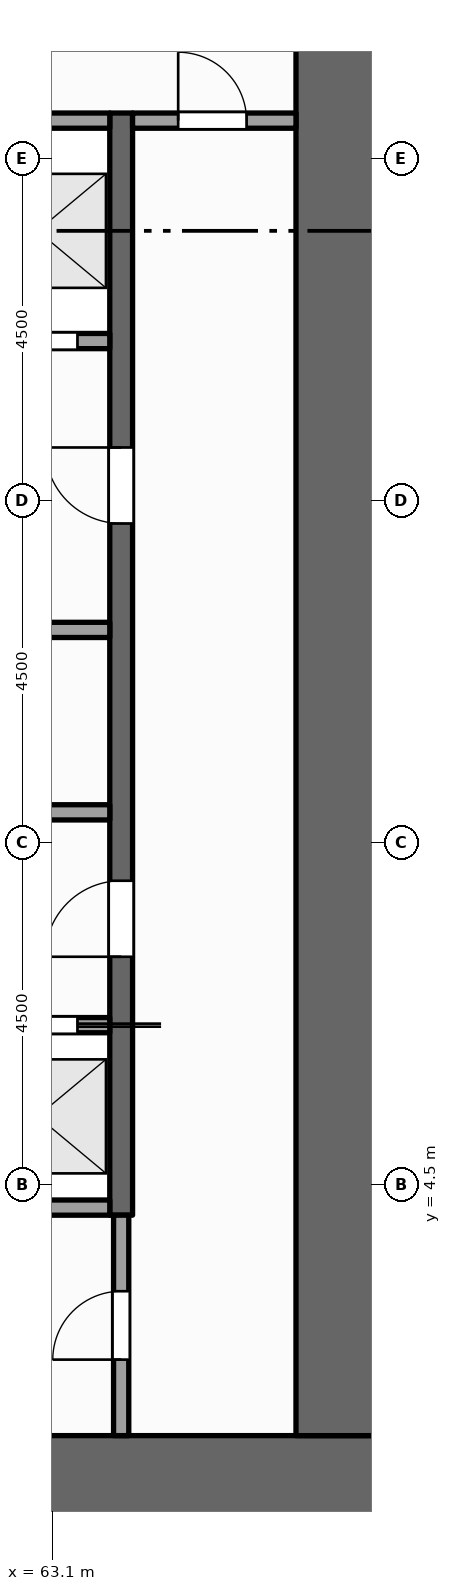
"""IFC4 building model, lengths in metres.
Left out: names, types, materials, properties, quantities, classifications, styles, units other than length and angle.
Written with IfcOpenShell. Run it as: python <this file> out.ifc"""

import sys

from ifc_helpers import new_model, si_unit, direction, frame, frame_2d, origin, place, context, subcontext, project, spatial, rectangle, extrude, element, fill, save


model = new_model("IFC4")
c1 = context("Model", 3, precision=1e-05, world=origin(), true_north=direction((0.0, 1.0)))
c2 = subcontext(c1, "Body", "Model", "MODEL_VIEW")
j1 = project(units=[si_unit("LENGTHUNIT", "METRE"), si_unit("PLANEANGLEUNIT", "RADIAN")], contexts=[c1])
p1 = place(None, origin())
s1 = spatial("IfcSite", under=j1, at=p1, CompositionType="ELEMENT")
p2 = place(p1, origin())
s2 = spatial("IfcBuilding", under=s1, at=p2, CompositionType="ELEMENT")
p3 = place(p2, frame((0.0, 0.0, 8.0)))
s3 = spatial("IfcBuildingStorey", under=s2, at=p3, CompositionType="ELEMENT", Elevation=8.0)
p4 = place(p3, frame((67.5, 0.6, -0.15), z_axis=(0.0, 0.0, 1.0), x_axis=(-1.0, 0.0, 0.0)))
e1 = element("IfcWall", 1, at=p4, inside=s3, PredefinedType="SHEAR", context=c2, shape_type="SweptSolid", body=[
    extrude(rectangle(XDim=13.5, YDim=1.2, at=frame_2d((6.75, 0.0))), origin(), (0.0, 0.0, 1.0), 6.0),
])
p5 = place(p3, frame((66.9, 1.2, -0.15), z_axis=(0.0, 0.0, 1.0), x_axis=(0.0, 1.0, 0.0)))
e2 = element("IfcWall", 2, at=p5, inside=s3, PredefinedType="SHEAR", context=c2, shape_type="SweptSolid", body=[
    extrude(rectangle(XDim=20.1, YDim=1.2, at=frame_2d((10.05, 0.0))), origin(), (0.0, 0.0, 1.0), 6.0),
])
p6 = place(p3, frame((64.0, 1.2, 0.0), z_axis=(0.0, 0.0, 1.0), x_axis=(0.0, 1.0, 0.0)))
e3 = element("IfcWall", 3, at=p6, inside=s3, PredefinedType="PARTITIONING", context=c2, shape_type="SweptSolid", body=[
    extrude(rectangle(XDim=2.9, YDim=0.2, at=frame_2d((1.45, 0.0))), origin(), (0.0, 0.0, 1.0), 5.75),
])
p7 = place(p6, frame((1.0, 0.0, 0.0)))
e4 = element("IfcOpeningElement", 4, at=p7, cuts=e3, PredefinedType="OPENING", context=c2, shape_type="SweptSolid", body=[
    extrude(rectangle(XDim=0.9, YDim=2.1, at=frame_2d((0.45, 1.05))), frame((0.0, 0.11, 0.0), z_axis=(0.0, -1.0, 0.0), x_axis=(1.0, 0.0, 0.0)), (0.0, 0.0, 1.0), 0.22),
])
p8 = place(p3, frame((64.0, 4.1, 0.0), z_axis=(0.0, 0.0, 1.0), x_axis=(0.0, 1.0, 0.0)))
e5 = element("IfcWall", 5, at=p8, inside=s3, PredefinedType="SHEAR", context=c2, shape_type="SweptSolid", body=[
    extrude(rectangle(XDim=14.5, YDim=0.3, at=frame_2d((7.25, 0.0))), origin(), (0.0, 0.0, 1.0), 5.75),
])
p9 = place(p8, frame((3.4, 0.0, 0.0)))
e6 = element("IfcOpeningElement", 6, at=p9, cuts=e5, PredefinedType="OPENING", context=c2, shape_type="SweptSolid", body=[
    extrude(rectangle(XDim=1.0, YDim=2.1, at=frame_2d((0.5, 1.05))), frame((0.0, 0.16, 0.0), z_axis=(0.0, -1.0, 0.0), x_axis=(1.0, 0.0, 0.0)), (0.0, 0.0, 1.0), 0.32),
])
p10 = place(p8, frame((9.1, 0.0, 0.0)))
e7 = element("IfcOpeningElement", 7, at=p10, cuts=e5, PredefinedType="OPENING", context=c2, shape_type="SweptSolid", body=[
    extrude(rectangle(XDim=1.0, YDim=2.1, at=frame_2d((0.5, 1.05))), frame((0.0, 0.16, 0.0), z_axis=(0.0, -1.0, 0.0), x_axis=(1.0, 0.0, 0.0)), (0.0, 0.0, 1.0), 0.32),
])
p11 = place(p3, frame((61.9, 4.2, 0.0), z_axis=(0.0, 0.0, 1.0), x_axis=(1.0, 0.0, 0.0)))
e8 = element("IfcWall", 8, at=p11, inside=s3, PredefinedType="SOLIDWALL", context=c2, shape_type="SweptSolid", body=[
    extrude(rectangle(XDim=1.95, YDim=0.2, at=frame_2d((0.975, 0.0))), origin(), (0.0, 0.0, 1.0), 5.75),
])
p12 = place(p3, frame((61.9, 6.6, 0.0), z_axis=(0.0, 0.0, 1.0), x_axis=(1.0, 0.0, 0.0)))
e9 = element("IfcWall", 9, at=p12, inside=s3, PredefinedType="SOLIDWALL", context=c2, shape_type="SweptSolid", body=[
    extrude(rectangle(XDim=1.95, YDim=0.2, at=frame_2d((0.975, 0.0))), origin(), (0.0, 0.0, 1.0), 5.75),
])
p13 = place(p12, frame((0.425, 0.0, 0.012)))
e10 = element("IfcOpeningElement", 10, at=p13, cuts=e9, PredefinedType="OPENING", context=c2, shape_type="SweptSolid", body=[
    extrude(rectangle(XDim=1.1, YDim=2.1, at=frame_2d((0.55, 1.05))), frame((0.0, 0.11, 0.0), z_axis=(0.0, -1.0, 0.0), x_axis=(1.0, 0.0, 0.0)), (0.0, 0.0, 1.0), 0.22),
])
p14 = place(p3, frame((55.2, 9.4, 0.0), z_axis=(0.0, 0.0, 1.0), x_axis=(1.0, 0.0, 0.0)))
e11 = element("IfcWall", 11, at=p14, inside=s3, PredefinedType="PARTITIONING", context=c2, shape_type="SweptSolid", body=[
    extrude(rectangle(XDim=8.65, YDim=0.2, at=frame_2d((4.325, 0.0))), origin(), (0.0, 0.0, 1.0), 5.75),
])
p15 = place(p14, frame((3.875, 0.0, 0.0)))
e12 = element("IfcOpeningElement", 12, at=p15, cuts=e11, PredefinedType="OPENING", context=c2, shape_type="SweptSolid", body=[
    extrude(rectangle(XDim=0.9, YDim=2.1, at=frame_2d((0.45, 1.05))), frame((0.0, 0.11, 0.0), z_axis=(0.0, -1.0, 0.0), x_axis=(1.0, 0.0, 0.0)), (0.0, 0.0, 1.0), 0.22),
])
p16 = place(p3, frame((59.7, 11.8, 0.0), z_axis=(0.0, 0.0, 1.0), x_axis=(1.0, 0.0, 0.0)))
e13 = element("IfcWall", 13, at=p16, inside=s3, PredefinedType="PARTITIONING", context=c2, shape_type="SweptSolid", body=[
    extrude(rectangle(XDim=4.15, YDim=0.2, at=frame_2d((2.075, 0.0))), origin(), (0.0, 0.0, 1.0), 5.75),
])
p17 = place(p3, frame((61.9, 15.6, 0.0), z_axis=(0.0, 0.0, 1.0), x_axis=(1.0, 0.0, 0.0)))
e14 = element("IfcWall", 14, at=p17, inside=s3, PredefinedType="SOLIDWALL", context=c2, shape_type="SweptSolid", body=[
    extrude(rectangle(XDim=1.95, YDim=0.2, at=frame_2d((0.975, 0.0))), origin(), (0.0, 0.0, 1.0), 5.75),
])
p18 = place(p17, frame((0.425, 0.0, 0.012)))
e15 = element("IfcOpeningElement", 15, at=p18, cuts=e14, PredefinedType="OPENING", context=c2, shape_type="SweptSolid", body=[
    extrude(rectangle(XDim=1.1, YDim=2.1, at=frame_2d((0.55, 1.05))), frame((0.0, 0.11, 0.0), z_axis=(0.0, -1.0, 0.0), x_axis=(1.0, 0.0, 0.0)), (0.0, 0.0, 1.0), 0.22),
])
p19 = place(p3, frame((61.9, 18.5, 0.0), z_axis=(0.0, 0.0, 1.0), x_axis=(1.0, 0.0, 0.0)))
e16 = element("IfcWall", 16, at=p19, inside=s3, PredefinedType="SOLIDWALL", context=c2, shape_type="SweptSolid", body=[
    extrude(rectangle(XDim=1.95, YDim=0.2, at=frame_2d((0.975, 0.0))), origin(), (0.0, 0.0, 1.0), 5.75),
])
p20 = place(p3, frame((64.15, 18.5, 0.0), z_axis=(0.0, 0.0, 1.0), x_axis=(1.0, 0.0, 0.0)))
e17 = element("IfcWall", 17, at=p20, inside=s3, PredefinedType="PARTITIONING", context=c2, shape_type="SweptSolid", body=[
    extrude(rectangle(XDim=2.15, YDim=0.2, at=frame_2d((1.075, 0.0))), origin(), (0.0, 0.0, 1.0), 5.75),
])
p21 = place(p20, frame((0.6, 0.0, 0.0)))
e18 = element("IfcOpeningElement", 18, at=p21, cuts=e17, PredefinedType="OPENING", context=c2, shape_type="SweptSolid", body=[
    extrude(rectangle(XDim=0.9, YDim=2.1, at=frame_2d((0.45, 1.05))), frame((0.0, 0.11, 0.0), z_axis=(0.0, -1.0, 0.0), x_axis=(1.0, 0.0, 0.0)), (0.0, 0.0, 1.0), 0.22),
])
p22 = place(p13, origin())
e19 = element("IfcDoor", 19, at=p22, inside=s3, OperationType="SLIDING_TO_RIGHT", PredefinedType="DOOR", context=c2, shape_type="SweptSolid", body=[
    extrude(rectangle(XDim=1.1, YDim=2.1, at=frame_2d((0.55, 1.05))), frame((0.0, 0.025, 0.0), z_axis=(0.0, -1.0, 0.0), x_axis=(1.0, 0.0, 0.0)), (0.0, 0.0, 1.0), 0.05),
])
fill(e10, e19)
p23 = place(p18, origin())
e20 = element("IfcDoor", 20, at=p23, inside=s3, OperationType="SLIDING_TO_LEFT", PredefinedType="DOOR", context=c2, shape_type="SweptSolid", body=[
    extrude(rectangle(XDim=1.1, YDim=2.1, at=frame_2d((0.55, 1.05))), frame((0.0, 0.025, 0.0), z_axis=(0.0, -1.0, 0.0), x_axis=(1.0, 0.0, 0.0)), (0.0, 0.0, 1.0), 0.05),
])
fill(e15, e20)
p24 = place(p9, origin())
e21 = element("IfcDoor", 21, at=p24, inside=s3, OperationType="SINGLE_SWING_LEFT", PredefinedType="DOOR", context=c2, shape_type="SweptSolid", body=[
    extrude(rectangle(XDim=1.0, YDim=2.1, at=frame_2d((0.5, 1.05))), frame((0.0, 0.025, 0.0), z_axis=(0.0, -1.0, 0.0), x_axis=(1.0, 0.0, 0.0)), (0.0, 0.0, 1.0), 0.05),
])
fill(e6, e21)
p25 = place(p10, origin())
e22 = element("IfcDoor", 22, at=p25, inside=s3, OperationType="SINGLE_SWING_RIGHT", PredefinedType="DOOR", context=c2, shape_type="SweptSolid", body=[
    extrude(rectangle(XDim=1.0, YDim=2.1, at=frame_2d((0.5, 1.05))), frame((0.0, 0.025, 0.0), z_axis=(0.0, -1.0, 0.0), x_axis=(1.0, 0.0, 0.0)), (0.0, 0.0, 1.0), 0.05),
])
fill(e7, e22)
p26 = place(p7, origin())
e23 = element("IfcDoor", 23, at=p26, inside=s3, OperationType="SINGLE_SWING_LEFT", PredefinedType="DOOR", context=c2, shape_type="SweptSolid", body=[
    extrude(rectangle(XDim=0.9, YDim=2.1, at=frame_2d((0.45, 1.05))), frame((0.0, 0.025, 0.0), z_axis=(0.0, -1.0, 0.0), x_axis=(1.0, 0.0, 0.0)), (0.0, 0.0, 1.0), 0.05),
])
fill(e4, e23)
p27 = place(p21, origin())
e24 = element("IfcDoor", 24, at=p27, inside=s3, OperationType="SINGLE_SWING_LEFT", PredefinedType="DOOR", context=c2, shape_type="SweptSolid", body=[
    extrude(rectangle(XDim=0.9, YDim=2.1, at=frame_2d((0.45, 1.05))), frame((0.0, 0.025, 0.0), z_axis=(0.0, -1.0, 0.0), x_axis=(1.0, 0.0, 0.0)), (0.0, 0.0, 1.0), 0.05),
])
fill(e18, e24)
save(model, sys.argv[1])
